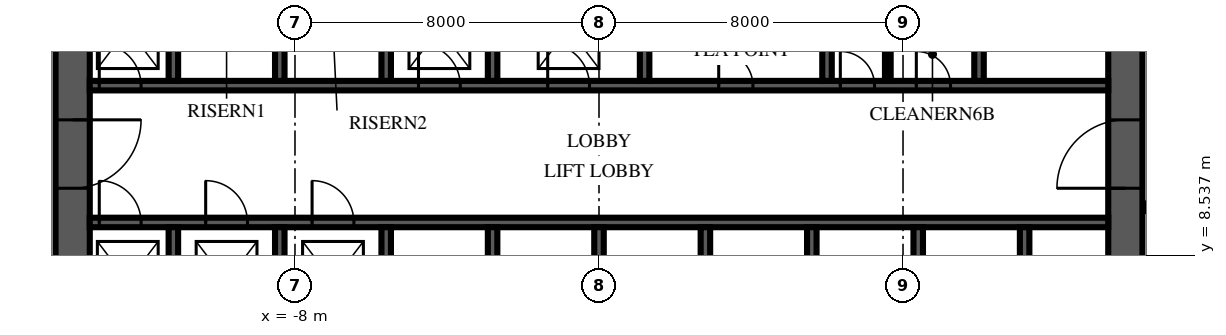
"""IFC4 building model, lengths in metres.
Left out: names, types, materials, properties, quantities, classifications, styles, units other than length and angle.
Written with IfcOpenShell. Run it as: python <this file> out.ifc"""

import sys

from ifc_helpers import new_model, si_unit, direction, frame, frame_2d, origin, place, context, subcontext, project, spatial, polyline, rectangle, outline, extrude, element, fill, save


model = new_model("IFC4")
c1 = context("Model", 3, precision=1e-05, world=origin(), true_north=direction((0.0, 1.0)))
c2 = subcontext(c1, "Body", "Model", "MODEL_VIEW")
j1 = project(units=[si_unit("LENGTHUNIT", "METRE"), si_unit("PLANEANGLEUNIT", "RADIAN")], contexts=[c1])
p1 = place(None, origin())
s1 = spatial("IfcSite", under=j1, at=p1, CompositionType="ELEMENT")
p2 = place(p1, origin())
s2 = spatial("IfcBuilding", under=s1, at=p2, CompositionType="ELEMENT")
p3 = place(p2, frame((0.0, 0.0, 60.0)))
s3 = spatial("IfcBuildingStorey", under=s2, at=p3, CompositionType="ELEMENT", Elevation=60.0)
p4 = place(p3, frame((13.85, 6.15, 0.0), z_axis=(0.0, 0.0, 1.0), x_axis=(0.0, 1.0, 0.0)))
e1 = element("IfcWall", 1, at=p4, inside=s3, PredefinedType="SHEAR", context=c2, shape_type="SweptSolid", body=[
    extrude(outline(polyline([(0.0, -0.45), (17.7, -0.45), (17.7, 0.0), (17.25, 0.0), (17.25, 0.45), (0.45, 0.45), (0.45, 0.0), (0.0, 0.0), (0.0, -0.45)])), origin(), (0.0, 0.0, 1.0), 4.0),
])
p5 = place(p4, frame((4.15, 0.0, 0.0)))
e2 = element("IfcOpeningElement", 2, at=p5, cuts=e1, PredefinedType="OPENING", context=c2, shape_type="SweptSolid", body=[
    extrude(rectangle(XDim=1.8, YDim=2.4, at=frame_2d((0.9, 1.2))), frame((0.0, 0.465, 0.0), z_axis=(0.0, -1.0, 0.0), x_axis=(1.0, 0.0, 0.0)), (0.0, 0.0, 1.0), 0.93),
])
p6 = place(p3, frame((-13.85, 23.85, 0.0), z_axis=(0.0, 0.0, 1.0), x_axis=(0.0, -1.0, 0.0)))
e3 = element("IfcWall", 3, at=p6, inside=s3, PredefinedType="SHEAR", context=c2, shape_type="SweptSolid", body=[
    extrude(outline(polyline([(0.0, -0.45), (17.7, -0.45), (17.7, 0.0), (17.25, 0.0), (17.25, 0.45), (0.45, 0.45), (0.45, 0.0), (0.0, 0.0), (0.0, -0.45)])), origin(), (0.0, 0.0, 1.0), 4.0),
])
p7 = place(p6, frame((11.75, 0.0, 0.0)))
e4 = element("IfcOpeningElement", 4, at=p7, cuts=e3, PredefinedType="OPENING", context=c2, shape_type="SweptSolid", body=[
    extrude(rectangle(XDim=1.8, YDim=2.4, at=frame_2d((0.9, 1.2))), frame((0.0, 0.465, 0.0), z_axis=(0.0, -1.0, 0.0), x_axis=(1.0, 0.0, 0.0)), (0.0, 0.0, 1.0), 0.93),
])
p8 = place(p3, frame((-13.4, 9.4, 0.0), z_axis=(0.0, 0.0, 1.0), x_axis=(1.0, 0.0, 0.0)))
e5 = element("IfcWall", 5, at=p8, inside=s3, PredefinedType="SHEAR", context=c2, shape_type="SweptSolid", body=[
    extrude(rectangle(XDim=26.8, YDim=0.25, at=frame_2d((13.4, 0.0))), origin(), (0.0, 0.0, 1.0), 4.0),
])
p9 = place(p8, frame((0.25, 0.0, 0.0)))
e6 = element("IfcOpeningElement", 6, at=p9, cuts=e5, PredefinedType="OPENING", context=c2, shape_type="SweptSolid", body=[
    extrude(rectangle(XDim=1.1, YDim=2.1, at=frame_2d((0.55, 1.05))), frame((0.0, 0.14, 0.0), z_axis=(0.0, -1.0, 0.0), x_axis=(1.0, 0.0, 0.0)), (0.0, 0.0, 1.0), 0.28),
])
p10 = place(p8, frame((3.05, 0.0, 0.0)))
e7 = element("IfcOpeningElement", 7, at=p10, cuts=e5, PredefinedType="OPENING", context=c2, shape_type="SweptSolid", body=[
    extrude(rectangle(XDim=1.1, YDim=2.1, at=frame_2d((0.55, 1.05))), frame((0.0, 0.14, 0.0), z_axis=(0.0, -1.0, 0.0), x_axis=(1.0, 0.0, 0.0)), (0.0, 0.0, 1.0), 0.28),
])
p11 = place(p8, frame((5.85, 0.0, 0.0)))
e8 = element("IfcOpeningElement", 8, at=p11, cuts=e5, PredefinedType="OPENING", context=c2, shape_type="SweptSolid", body=[
    extrude(rectangle(XDim=1.1, YDim=2.1, at=frame_2d((0.55, 1.05))), frame((0.0, 0.14, 0.0), z_axis=(0.0, -1.0, 0.0), x_axis=(1.0, 0.0, 0.0)), (0.0, 0.0, 1.0), 0.28),
])
p12 = place(p3, frame((-13.4, 13.0, 0.0), z_axis=(0.0, 0.0, 1.0), x_axis=(1.0, 0.0, 0.0)))
e9 = element("IfcWall", 9, at=p12, inside=s3, PredefinedType="SHEAR", context=c2, shape_type="SweptSolid", body=[
    extrude(rectangle(XDim=26.8, YDim=0.25, at=frame_2d((13.4, 0.0))), origin(), (0.0, 0.0, 1.0), 4.0),
])
p13 = place(p12, frame((0.25, 0.0, 0.0)))
e10 = element("IfcOpeningElement", 10, at=p13, cuts=e9, PredefinedType="OPENING", context=c2, shape_type="SweptSolid", body=[
    extrude(rectangle(XDim=1.1, YDim=2.1, at=frame_2d((0.55, 1.05))), frame((0.0, 0.14, 0.0), z_axis=(0.0, -1.0, 0.0), x_axis=(1.0, 0.0, 0.0)), (0.0, 0.0, 1.0), 0.28),
])
p14 = place(p12, frame((8.65, 0.0, 0.0)))
e11 = element("IfcOpeningElement", 11, at=p14, cuts=e9, PredefinedType="OPENING", context=c2, shape_type="SweptSolid", body=[
    extrude(rectangle(XDim=1.1, YDim=2.1, at=frame_2d((0.55, 1.05))), frame((0.0, 0.14, 0.0), z_axis=(0.0, -1.0, 0.0), x_axis=(1.0, 0.0, 0.0)), (0.0, 0.0, 1.0), 0.28),
])
p15 = place(p12, frame((12.05, 0.0, 0.0)))
e12 = element("IfcOpeningElement", 12, at=p15, cuts=e9, PredefinedType="OPENING", context=c2, shape_type="SweptSolid", body=[
    extrude(rectangle(XDim=1.1, YDim=2.1, at=frame_2d((0.55, 1.05))), frame((0.0, 0.14, 0.0), z_axis=(0.0, -1.0, 0.0), x_axis=(1.0, 0.0, 0.0)), (0.0, 0.0, 1.0), 0.28),
])
p16 = place(p12, frame((16.55, 0.0, 0.0)))
e13 = element("IfcOpeningElement", 13, at=p16, cuts=e9, PredefinedType="OPENING", context=c2, shape_type="SweptSolid", body=[
    extrude(rectangle(XDim=0.9, YDim=2.1, at=frame_2d((0.45, 1.05))), frame((0.0, 0.14, 0.0), z_axis=(0.0, -1.0, 0.0), x_axis=(1.0, 0.0, 0.0)), (0.0, 0.0, 1.0), 0.28),
])
p17 = place(p12, frame((19.75, 0.0, 0.0)))
e14 = element("IfcOpeningElement", 14, at=p17, cuts=e9, PredefinedType="OPENING", context=c2, shape_type="SweptSolid", body=[
    extrude(rectangle(XDim=0.9, YDim=2.1, at=frame_2d((0.45, 1.05))), frame((0.0, 0.14, 0.0), z_axis=(0.0, -1.0, 0.0), x_axis=(1.0, 0.0, 0.0)), (0.0, 0.0, 1.0), 0.28),
])
p18 = place(p12, frame((21.75, 0.0, 0.0)))
e15 = element("IfcOpeningElement", 15, at=p18, cuts=e9, PredefinedType="OPENING", context=c2, shape_type="SweptSolid", body=[
    extrude(rectangle(XDim=0.9, YDim=2.1, at=frame_2d((0.45, 1.05))), frame((0.0, 0.14, 0.0), z_axis=(0.0, -1.0, 0.0), x_axis=(1.0, 0.0, 0.0)), (0.0, 0.0, 1.0), 0.28),
])
for number, where, z_axis, x_axis in (
    (16, (-11.2, 6.6, 0.0), (0.0, 0.0, 1.0), (0.0, 1.0, 0.0)),
    (17, (-8.4, 6.6, 0.0), (0.0, 0.0, 1.0), (0.0, 1.0, 0.0)),
    (18, (-5.6, 6.6, 0.0), (0.0, 0.0, 1.0), (0.0, 1.0, 0.0)),
    (19, (-2.8, 6.6, 0.0), (0.0, 0.0, 1.0), (0.0, 1.0, 0.0)),
    (20, (0.0, 6.6, 0.0), (0.0, 0.0, 1.0), (0.0, 1.0, 0.0)),
    (21, (2.8, 6.6, 0.0), (0.0, 0.0, 1.0), (0.0, 1.0, 0.0)),
    (22, (5.6, 6.6, 0.0), (0.0, 0.0, 1.0), (0.0, 1.0, 0.0)),
    (23, (8.4, 6.6, 0.0), (0.0, 0.0, 1.0), (0.0, 1.0, 0.0)),
    (24, (11.2, 6.6, 0.0), (0.0, 0.0, 1.0), (0.0, 1.0, 0.0)),
):
    element("IfcWall", number, at=place(p3, frame(where, z_axis=z_axis, x_axis=x_axis)), inside=s3, PredefinedType="SHEAR", context=c2, shape_type="SweptSolid", body=[
        extrude(rectangle(XDim=2.675, YDim=0.25, at=frame_2d((1.337, 0.0))), origin(), (0.0, 0.0, 1.0), 4.0),
    ])
for number, where, z_axis, x_axis in (
    (25, (-11.2, 13.125, 0.0), (0.0, 0.0, 1.0), (0.0, 1.0, 0.0)),
    (26, (-8.4, 13.125, 0.0), (0.0, 0.0, 1.0), (0.0, 1.0, 0.0)),
    (27, (-5.6, 13.125, 0.0), (0.0, 0.0, 1.0), (0.0, 1.0, 0.0)),
    (28, (-2.8, 13.125, 0.0), (0.0, 0.0, 1.0), (0.0, 1.0, 0.0)),
    (29, (1.2, 13.125, 0.0), (0.0, 0.0, 1.0), (0.0, 1.0, 0.0)),
    (30, (6.0, 13.125, 0.0), (0.0, 0.0, 1.0), (0.0, 1.0, 0.0)),
    (31, (10.0, 13.125, 0.0), (0.0, 0.0, 1.0), (0.0, 1.0, 0.0)),
):
    element("IfcWall", number, at=place(p3, frame(where, z_axis=z_axis, x_axis=x_axis)), inside=s3, PredefinedType="SHEAR", context=c2, shape_type="SweptSolid", body=[
        extrude(rectangle(XDim=2.75, YDim=0.25, at=frame_2d((1.375, 0.0))), origin(), (0.0, 0.0, 1.0), 4.0),
    ])
p19 = place(p3, frame((7.6, 13.125, 0.0), z_axis=(0.0, 0.0, 1.0), x_axis=(0.0, 1.0, 0.0)))
e32 = element("IfcWall", 32, at=p19, inside=s3, PredefinedType="PARTITIONING", context=c2, shape_type="SweptSolid", body=[
    extrude(rectangle(XDim=1.55, YDim=0.15, at=frame_2d((0.775, 0.0))), origin(), (0.0, 0.0, 1.0), 3.85),
])
p20 = place(p3, frame((14.33, 9.8, 0.0), z_axis=(0.0, 0.0, 1.0), x_axis=(1.0, 0.0, 0.0)))
e33 = element("IfcWall", 33, at=p20, inside=s3, PredefinedType="PARTITIONING", context=c2, shape_type="SweptSolid", body=[
    extrude(rectangle(XDim=2.02, YDim=0.2, at=frame_2d((1.01, 0.0))), origin(), (0.0, 0.0, 1.0), 3.85),
])
p21 = place(p5, origin())
e34 = element("IfcDoor", 34, at=p21, inside=s3, OperationType="DOUBLE_DOOR_SINGLE_SWING", PredefinedType="DOOR", context=c2, shape_type="SweptSolid", body=[
    extrude(rectangle(XDim=1.8, YDim=2.4, at=frame_2d((0.9, 1.2))), frame((0.0, 0.45, 0.0), z_axis=(0.0, -1.0, 0.0), x_axis=(1.0, 0.0, 0.0)), (0.0, 0.0, 1.0), 0.899),
])
fill(e2, e34)
p22 = place(p7, origin())
e35 = element("IfcDoor", 35, at=p22, inside=s3, OperationType="DOUBLE_DOOR_SINGLE_SWING", PredefinedType="DOOR", context=c2, shape_type="SweptSolid", body=[
    extrude(rectangle(XDim=1.8, YDim=2.4, at=frame_2d((0.9, 1.2))), frame((0.0, 0.45, 0.0), z_axis=(0.0, -1.0, 0.0), x_axis=(1.0, 0.0, 0.0)), (0.0, 0.0, 1.0), 0.899),
])
fill(e4, e35)
p23 = place(p9, origin())
e36 = element("IfcDoor", 36, at=p23, inside=s3, OperationType="SLIDING_TO_LEFT", PredefinedType="DOOR", context=c2, shape_type="SweptSolid", body=[
    extrude(rectangle(XDim=1.1, YDim=2.1, at=frame_2d((0.55, 1.05))), frame((0.0, 0.125, 0.0), z_axis=(0.0, -1.0, 0.0), x_axis=(1.0, 0.0, 0.0)), (0.0, 0.0, 1.0), 0.25),
])
fill(e6, e36)
p24 = place(p10, origin())
e37 = element("IfcDoor", 37, at=p24, inside=s3, OperationType="SLIDING_TO_LEFT", PredefinedType="DOOR", context=c2, shape_type="SweptSolid", body=[
    extrude(rectangle(XDim=1.1, YDim=2.1, at=frame_2d((0.55, 1.05))), frame((0.0, 0.125, 0.0), z_axis=(0.0, -1.0, 0.0), x_axis=(1.0, 0.0, 0.0)), (0.0, 0.0, 1.0), 0.25),
])
fill(e7, e37)
p25 = place(p11, origin())
e38 = element("IfcDoor", 38, at=p25, inside=s3, OperationType="SLIDING_TO_LEFT", PredefinedType="DOOR", context=c2, shape_type="SweptSolid", body=[
    extrude(rectangle(XDim=1.1, YDim=2.1, at=frame_2d((0.55, 1.05))), frame((0.0, 0.125, 0.0), z_axis=(0.0, -1.0, 0.0), x_axis=(1.0, 0.0, 0.0)), (0.0, 0.0, 1.0), 0.25),
])
fill(e8, e38)
p26 = place(p13, origin())
e39 = element("IfcDoor", 39, at=p26, inside=s3, OperationType="SLIDING_TO_LEFT", PredefinedType="DOOR", context=c2, shape_type="SweptSolid", body=[
    extrude(rectangle(XDim=1.1, YDim=2.1, at=frame_2d((0.55, 1.05))), frame((0.0, 0.125, 0.0), z_axis=(0.0, -1.0, 0.0), x_axis=(1.0, 0.0, 0.0)), (0.0, 0.0, 1.0), 0.25),
])
fill(e10, e39)
p27 = place(p14, origin())
e40 = element("IfcDoor", 40, at=p27, inside=s3, OperationType="SLIDING_TO_LEFT", PredefinedType="DOOR", context=c2, shape_type="SweptSolid", body=[
    extrude(rectangle(XDim=1.1, YDim=2.1, at=frame_2d((0.55, 1.05))), frame((0.0, 0.125, 0.0), z_axis=(0.0, -1.0, 0.0), x_axis=(1.0, 0.0, 0.0)), (0.0, 0.0, 1.0), 0.25),
])
fill(e11, e40)
p28 = place(p15, origin())
e41 = element("IfcDoor", 41, at=p28, inside=s3, OperationType="SLIDING_TO_LEFT", PredefinedType="DOOR", context=c2, shape_type="SweptSolid", body=[
    extrude(rectangle(XDim=1.1, YDim=2.1, at=frame_2d((0.55, 1.05))), frame((0.0, 0.125, 0.0), z_axis=(0.0, -1.0, 0.0), x_axis=(1.0, 0.0, 0.0)), (0.0, 0.0, 1.0), 0.25),
])
fill(e12, e41)
p29 = place(p16, origin())
e42 = element("IfcDoor", 42, at=p29, inside=s3, OperationType="SINGLE_SWING_LEFT", PredefinedType="DOOR", context=c2, shape_type="SweptSolid", body=[
    extrude(rectangle(XDim=0.9, YDim=2.1, at=frame_2d((0.45, 1.05))), frame((0.0, 0.125, 0.0), z_axis=(0.0, -1.0, 0.0), x_axis=(1.0, 0.0, 0.0)), (0.0, 0.0, 1.0), 0.25),
])
fill(e13, e42)
p30 = place(p17, origin())
e43 = element("IfcDoor", 43, at=p30, inside=s3, OperationType="SINGLE_SWING_LEFT", PredefinedType="DOOR", context=c2, shape_type="SweptSolid", body=[
    extrude(rectangle(XDim=0.9, YDim=2.1, at=frame_2d((0.45, 1.05))), frame((0.0, 0.125, 0.0), z_axis=(0.0, -1.0, 0.0), x_axis=(1.0, 0.0, 0.0)), (0.0, 0.0, 1.0), 0.25),
])
fill(e14, e43)
p31 = place(p18, origin())
e44 = element("IfcDoor", 44, at=p31, inside=s3, OperationType="SINGLE_SWING_LEFT", PredefinedType="DOOR", context=c2, shape_type="SweptSolid", body=[
    extrude(rectangle(XDim=0.9, YDim=2.1, at=frame_2d((0.45, 1.05))), frame((0.0, 0.125, 0.0), z_axis=(0.0, -1.0, 0.0), x_axis=(1.0, 0.0, 0.0)), (0.0, 0.0, 1.0), 0.25),
])
fill(e15, e44)
save(model, sys.argv[1])
